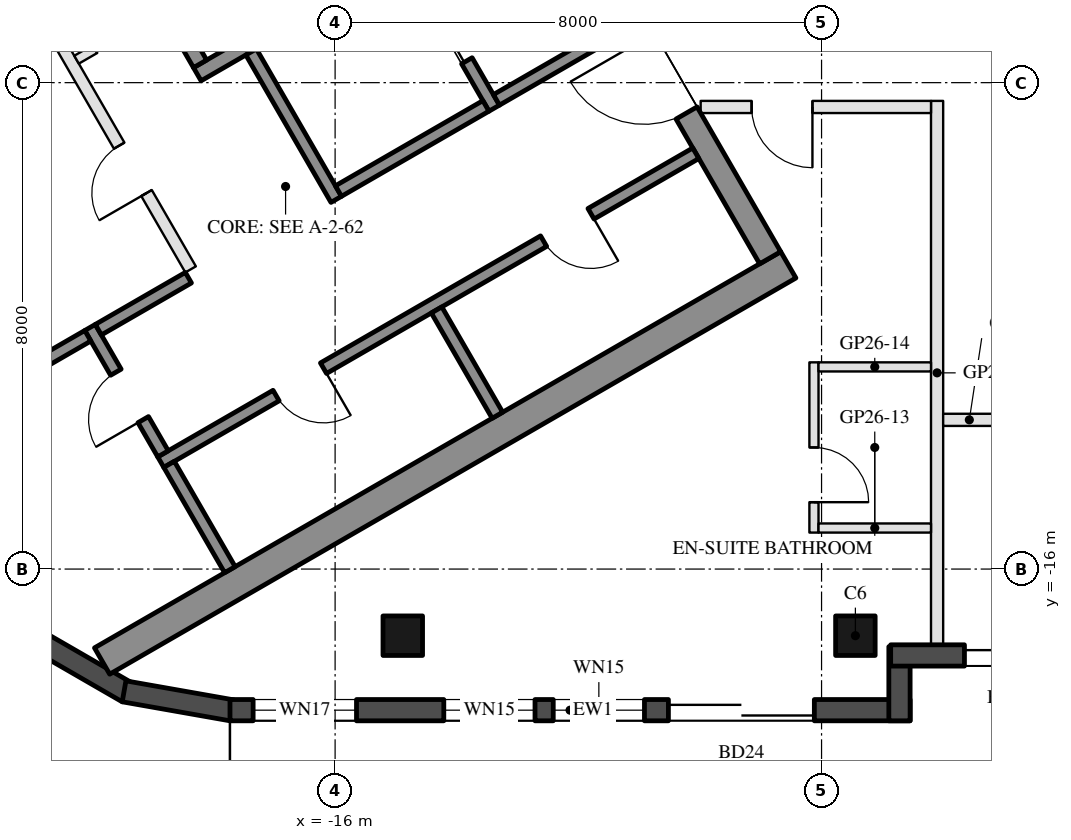
"""IFC4 building model, lengths in metres.
Left out: names, types, materials, properties, quantities, classifications, styles, units other than length and angle.
Written with IfcOpenShell. Run it as: python <this file> out.ifc"""

import sys

from ifc_helpers import new_model, si_unit, direction, frame, frame_2d, origin, origin_2d, place, context, subcontext, project, spatial, rectangle, hollow_rectangle, extrude, boolean, halfspace, element, fill, save


model = new_model("IFC4")
c1 = context("Model", 3, precision=1e-05, world=origin(), true_north=direction((0.0, 1.0)))
c2 = subcontext(c1, "Body", "Model", "MODEL_VIEW")
j1 = project(units=[si_unit("LENGTHUNIT", "METRE"), si_unit("PLANEANGLEUNIT", "RADIAN")], contexts=[c1])
p1 = place(None, origin())
s1 = spatial("IfcSite", under=j1, at=p1, CompositionType="ELEMENT")
p2 = place(p1, origin())
s2 = spatial("IfcBuilding", under=s1, at=p2, CompositionType="ELEMENT")
p3 = place(p2, frame((0.0, 0.0, 268.9)))
s3 = spatial("IfcBuildingStorey", under=s2, at=p3, CompositionType="ELEMENT", Elevation=268.9)
p4 = place(p3, frame((-14.887, -17.096, 0.0), z_axis=(0.0, 0.0, 1.0), x_axis=(-1.0, 0.0, 0.0)))
e1 = element("IfcColumn", 1, at=p4, inside=s3, PredefinedType="COLUMN", context=c2, shape_type="SweptSolid", body=[
    boolean("DIFFERENCE", extrude(hollow_rectangle(XDim=0.65, YDim=0.65, WallThickness=0.03, at=origin_2d()), origin(), (0.0, 0.0, 1.0), 3.7), halfspace(frame((0.0, 0.0, 0.047), z_axis=(0.0, 0.0, 1.0), x_axis=(1.0, 0.0, 0.0)), True)),
])
p5 = place(p3, frame((-7.444, -17.096, 0.0), z_axis=(0.0, 0.0, 1.0), x_axis=(-1.0, 0.0, 0.0)))
e2 = element("IfcColumn", 2, at=p5, inside=s3, PredefinedType="COLUMN", context=c2, shape_type="SweptSolid", body=[
    boolean("DIFFERENCE", extrude(hollow_rectangle(XDim=0.65, YDim=0.65, WallThickness=0.03, at=origin_2d()), origin(), (0.0, 0.0, 1.0), 3.7), halfspace(frame((0.0, 0.0, 0.04), z_axis=(0.0, 0.0, 1.0), x_axis=(1.0, 0.0, 0.0)), True)),
])
p6 = place(p3, frame((-20.972, -17.132, 0.0), z_axis=(0.0, 0.0, 1.0), x_axis=(0.866047807691, -0.499961193289, 0.0)))
e3 = element("IfcWall", 3, at=p6, inside=s3, PredefinedType="SOLIDWALL", context=c2, shape_type="SweptSolid", body=[
    extrude(rectangle(XDim=1.8, YDim=0.35, at=frame_2d((0.9, 0.0))), origin(), (0.0, 0.0, 1.0), 3.55),
])
p7 = place(p3, frame((-19.471, -18.011, 0.0), z_axis=(0.0, 0.0, 1.0), x_axis=(0.984810858511, -0.173630564586, 0.0)))
e4 = element("IfcWall", 4, at=p7, inside=s3, PredefinedType="SOLIDWALL", context=c2, shape_type="SweptSolid", body=[
    extrude(rectangle(XDim=1.8, YDim=0.35, at=frame_2d((0.9, 0.0))), origin(), (0.0, 0.0, 1.0), 3.55),
])
p8 = place(p3, frame((-17.729, -18.321, 0.0), z_axis=(0.0, 0.0, 1.0), x_axis=(1.0, 0.0, 0.0)))
e5 = element("IfcWall", 5, at=p8, inside=s3, PredefinedType="SOLIDWALL", context=c2, shape_type="SweptSolid", body=[
    extrude(rectangle(XDim=11.185, YDim=0.35, at=frame_2d((5.593, 0.0))), origin(), (0.0, 0.0, 1.0), 3.55),
])
p9 = place(p8, frame((0.381, 0.0, 0.3)))
e6 = element("IfcOpeningElement", 6, at=p9, cuts=e5, PredefinedType="OPENING", context=c2, shape_type="SweptSolid", body=[
    extrude(rectangle(XDim=1.7, YDim=2.65, at=frame_2d((0.85, 1.325))), frame((0.0, 0.185, 0.0), z_axis=(0.0, -1.0, 0.0), x_axis=(1.0, 0.0, 0.0)), (0.0, 0.0, 1.0), 0.37),
])
p10 = place(p8, frame((7.21, 0.0, 0.0)))
e7 = element("IfcOpeningElement", 7, at=p10, cuts=e5, PredefinedType="OPENING", context=c2, shape_type="SweptSolid", body=[
    extrude(rectangle(XDim=2.4, YDim=2.4, at=frame_2d((1.2, 1.2))), frame((0.0, 0.185, 0.0), z_axis=(0.0, -1.0, 0.0), x_axis=(1.0, 0.0, 0.0)), (0.0, 0.0, 1.0), 0.37),
])
p11 = place(p8, frame((3.516, 0.0, 0.3)))
e8 = element("IfcOpeningElement", 8, at=p11, cuts=e5, PredefinedType="OPENING", context=c2, shape_type="SweptSolid", body=[
    extrude(rectangle(XDim=1.5, YDim=2.65, at=frame_2d((0.75, 1.325))), frame((0.0, 0.185, 0.0), z_axis=(0.0, -1.0, 0.0), x_axis=(1.0, 0.0, 0.0)), (0.0, 0.0, 1.0), 0.37),
])
p12 = place(p8, frame((5.316, 0.0, 0.3)))
e9 = element("IfcOpeningElement", 9, at=p12, cuts=e5, PredefinedType="OPENING", context=c2, shape_type="SweptSolid", body=[
    extrude(rectangle(XDim=1.5, YDim=2.65, at=frame_2d((0.75, 1.325))), frame((0.0, 0.185, 0.0), z_axis=(0.0, -1.0, 0.0), x_axis=(1.0, 0.0, 0.0)), (0.0, 0.0, 1.0), 0.37),
])
p13 = place(p3, frame((-6.719, -18.496, 0.0), z_axis=(0.0, 0.0, 1.0), x_axis=(0.0, 1.0, 0.0)))
e10 = element("IfcWall", 10, at=p13, inside=s3, PredefinedType="SOLIDWALL", context=c2, shape_type="SweptSolid", body=[
    extrude(rectangle(XDim=1.22, YDim=0.35, at=frame_2d((0.61, 0.0))), origin(), (0.0, 0.0, 1.0), 3.55),
])
p14 = place(p3, frame((-6.864, -17.421, 0.0), z_axis=(0.0, 0.0, 1.0), x_axis=(1.0, 0.0, 0.0)))
e11 = element("IfcWall", 11, at=p14, inside=s3, PredefinedType="SOLIDWALL", context=c2, shape_type="SweptSolid", body=[
    extrude(rectangle(XDim=6.283, YDim=0.35, at=frame_2d((3.142, 0.0))), origin(), (0.0, 0.0, 1.0), 3.55),
])
p15 = place(p14, frame((1.213, 0.0, 0.0)))
e12 = element("IfcOpeningElement", 12, at=p15, cuts=e11, PredefinedType="OPENING", context=c2, shape_type="SweptSolid", body=[
    extrude(rectangle(XDim=1.5, YDim=2.4, at=frame_2d((0.75, 1.2))), frame((0.0, 0.185, 0.0), z_axis=(0.0, -1.0, 0.0), x_axis=(1.0, 0.0, 0.0)), (0.0, 0.0, 1.0), 0.37),
])
p16 = place(p14, frame((3.013, 0.0, 0.3)))
e13 = element("IfcOpeningElement", 13, at=p16, cuts=e11, PredefinedType="OPENING", context=c2, shape_type="SweptSolid", body=[
    extrude(rectangle(XDim=0.8, YDim=2.65, at=frame_2d((0.4, 1.325))), frame((0.0, 0.185, 0.0), z_axis=(0.0, -1.0, 0.0), x_axis=(1.0, 0.0, 0.0)), (0.0, 0.0, 1.0), 0.37),
])
for number, where, z_axis, x_axis in (
    (14, (-13.797, -1.903, 0.0), (0.0, 0.0, 1.0), (-0.866, -0.5, 0.0)),
    (15, (-8.547, -10.997, 0.0), (0.0, 0.0, 1.0), (-0.866, -0.5, 0.0)),
):
    element("IfcWall", number, at=place(p3, frame(where, z_axis=z_axis, x_axis=x_axis)), inside=s3, PredefinedType="SHEAR", context=c2, shape_type="SweptSolid", body=[
        extrude(rectangle(XDim=13.031, YDim=0.5, at=frame_2d((6.516, 0.0))), origin(), (0.0, 0.0, 1.0), 3.5),
    ])
p17 = place(p3, frame((-13.845, -2.22, 0.0), z_axis=(0.0, 0.0, 1.0), x_axis=(0.500004234368, -0.866022959057, 0.0)))
e16 = element("IfcWall", 16, at=p17, inside=s3, PredefinedType="SHEAR", context=c2, shape_type="SweptSolid", body=[
    extrude(rectangle(XDim=10.0, YDim=0.4, at=frame_2d((5.0, 0.0))), origin(), (0.0, 0.0, 1.0), 3.5),
])
p18 = place(p17, frame((3.55, 0.0, 0.0)))
e17 = element("IfcOpeningElement", 17, at=p18, cuts=e16, PredefinedType="OPENING", context=c2, shape_type="SweptSolid", body=[
    extrude(rectangle(XDim=1.1, YDim=2.1, at=frame_2d((0.55, 1.05))), frame((0.0, 0.21, 0.0), z_axis=(0.0, -1.0, 0.0), x_axis=(1.0, 0.0, 0.0)), (0.0, 0.0, 1.0), 0.42),
])
p19 = place(p17, frame((5.85, 0.0, 0.0)))
e18 = element("IfcOpeningElement", 18, at=p19, cuts=e16, PredefinedType="OPENING", context=c2, shape_type="SweptSolid", body=[
    extrude(rectangle(XDim=1.4, YDim=2.1, at=frame_2d((0.7, 1.05))), frame((0.0, 0.21, 0.0), z_axis=(0.0, -1.0, 0.0), x_axis=(1.0, 0.0, 0.0)), (0.0, 0.0, 1.0), 0.42),
])
p20 = place(p3, frame((-12.681, -4.636, 0.0), z_axis=(0.0, 0.0, 1.0), x_axis=(-0.866021702275, -0.500006411147, 0.0)))
e19 = element("IfcWall", 19, at=p20, inside=s3, PredefinedType="SHEAR", context=c2, shape_type="SweptSolid", body=[
    extrude(rectangle(XDim=6.45, YDim=0.25, at=frame_2d((3.225, 0.0))), origin(), (0.0, 0.0, 1.0), 3.5),
])
p21 = place(p20, frame((0.3, 0.0, 0.0)))
e20 = element("IfcOpeningElement", 20, at=p21, cuts=e19, PredefinedType="OPENING", context=c2, shape_type="SweptSolid", body=[
    extrude(rectangle(XDim=1.0, YDim=2.1, at=frame_2d((0.5, 1.05))), frame((0.0, 0.135, 0.0), z_axis=(0.0, -1.0, 0.0), x_axis=(1.0, 0.0, 0.0)), (0.0, 0.0, 1.0), 0.27),
])
p22 = place(p3, frame((-19.496, -5.482, 0.0), z_axis=(0.0, 0.0, 1.0), x_axis=(0.499990435942, -0.866030925526, 0.0)))
e21 = element("IfcWall", 21, at=p22, inside=s3, PredefinedType="SHEAR", context=c2, shape_type="SweptSolid", body=[
    extrude(rectangle(XDim=2.55, YDim=0.25, at=frame_2d((1.275, 0.0))), origin(), (0.0, 0.0, 1.0), 3.5),
])
p23 = place(p3, frame((-17.381, -7.495, 0.0), z_axis=(0.0, 0.0, 1.0), x_axis=(0.500011755427, -0.866018616679, 0.0)))
e22 = element("IfcWall", 22, at=p23, inside=s3, PredefinedType="SHEAR", context=c2, shape_type="SweptSolid", body=[
    extrude(rectangle(XDim=2.8, YDim=0.2, at=frame_2d((1.4, 0.0))), origin(), (0.0, 0.0, 1.0), 3.5),
])
p24 = place(p3, frame((-14.783, -5.995, 0.0), z_axis=(0.0, 0.0, 1.0), x_axis=(0.49994636267, -0.866056369097, 0.0)))
e23 = element("IfcWall", 23, at=p24, inside=s3, PredefinedType="SHEAR", context=c2, shape_type="SweptSolid", body=[
    extrude(rectangle(XDim=2.8, YDim=0.2, at=frame_2d((1.4, 0.0))), origin(), (0.0, 0.0, 1.0), 3.5),
])
p25 = place(p24, frame((0.7, 0.0, 0.0)))
e24 = element("IfcOpeningElement", 24, at=p25, cuts=e23, PredefinedType="OPENING", context=c2, shape_type="SweptSolid", body=[
    extrude(rectangle(XDim=1.2, YDim=2.1, at=frame_2d((0.6, 1.05))), frame((0.0, 0.11, 0.0), z_axis=(0.0, -1.0, 0.0), x_axis=(1.0, 0.0, 0.0)), (0.0, 0.0, 1.0), 0.22),
])
p26 = place(p3, frame((-13.52, -8.383, 0.0), z_axis=(0.0, 0.0, 1.0), x_axis=(-0.866034573852, -0.49998411664, 0.0)))
e25 = element("IfcWall", 25, at=p26, inside=s3, PredefinedType="SHEAR", context=c2, shape_type="SweptSolid", body=[
    extrude(rectangle(XDim=2.8, YDim=0.2, at=frame_2d((1.4, 0.0))), origin(), (0.0, 0.0, 1.0), 3.5),
])
p27 = place(p3, frame((-11.268, -7.083, 0.0), z_axis=(0.0, 0.0, 1.0), x_axis=(-0.866050077142, -0.499957262057, 0.0)))
e26 = element("IfcWall", 26, at=p27, inside=s3, PredefinedType="SHEAR", context=c2, shape_type="SweptSolid", body=[
    extrude(rectangle(XDim=2.4, YDim=0.2, at=frame_2d((1.2, 0.0))), origin(), (0.0, 0.0, 1.0), 3.5),
])
p28 = place(p3, frame((-10.068, -9.162, 0.0), z_axis=(0.0, 0.0, 1.0), x_axis=(-0.866032725843, -0.499987317609, 0.0)))
e27 = element("IfcWall", 27, at=p28, inside=s3, PredefinedType="SHEAR", context=c2, shape_type="SweptSolid", body=[
    extrude(rectangle(XDim=10.16, YDim=0.2, at=frame_2d((5.08, 0.0))), origin(), (0.0, 0.0, 1.0), 3.5),
])
p29 = place(p28, frame((1.99, 0.0, 0.0)))
e28 = element("IfcOpeningElement", 28, at=p29, cuts=e27, PredefinedType="OPENING", context=c2, shape_type="SweptSolid", body=[
    extrude(rectangle(XDim=0.9, YDim=2.1, at=frame_2d((0.45, 1.05))), frame((0.0, 0.11, 0.0), z_axis=(0.0, -1.0, 0.0), x_axis=(1.0, 0.0, 0.0)), (0.0, 0.0, 1.0), 0.22),
])
p30 = place(p28, frame((7.07, 0.0, 0.0)))
e29 = element("IfcOpeningElement", 29, at=p30, cuts=e27, PredefinedType="OPENING", context=c2, shape_type="SweptSolid", body=[
    extrude(rectangle(XDim=0.9, YDim=2.1, at=frame_2d((0.45, 1.05))), frame((0.0, 0.11, 0.0), z_axis=(0.0, -1.0, 0.0), x_axis=(1.0, 0.0, 0.0)), (0.0, 0.0, 1.0), 0.22),
])
p31 = place(p3, frame((-20.031, -12.026, 0.0), z_axis=(0.0, 0.0, 1.0), x_axis=(0.500033551112, -0.866006032174, 0.0)))
e30 = element("IfcWall", 30, at=p31, inside=s3, PredefinedType="SHEAR", context=c2, shape_type="SweptSolid", body=[
    extrude(rectangle(XDim=2.4, YDim=0.2, at=frame_2d((1.2, 0.0))), origin(), (0.0, 0.0, 1.0), 3.5),
])
p32 = place(p31, frame((0.85, 0.0, 0.0)))
e31 = element("IfcOpeningElement", 31, at=p32, cuts=e30, PredefinedType="OPENING", context=c2, shape_type="SweptSolid", body=[
    extrude(rectangle(XDim=0.9, YDim=2.1, at=frame_2d((0.45, 1.05))), frame((0.0, 0.11, 0.0), z_axis=(0.0, -1.0, 0.0), x_axis=(1.0, 0.0, 0.0)), (0.0, 0.0, 1.0), 0.22),
])
p33 = place(p3, frame((-18.413, -11.208, 0.0), z_axis=(0.0, 0.0, 1.0), x_axis=(-0.866038183914, -0.499977863513, 0.0)))
e32 = element("IfcWall", 32, at=p33, inside=s3, PredefinedType="SHEAR", context=c2, shape_type="SweptSolid", body=[
    extrude(rectangle(XDim=1.71, YDim=0.2, at=frame_2d((0.855, 0.0))), origin(), (0.0, 0.0, 1.0), 3.5),
])
for number, where, z_axis, x_axis in (
    (33, (-14.331, -11.738, 0.0), (0.0, 0.0, 1.0), (0.5, -0.866, 0.0)),
    (34, (-18.73, -14.278, 0.0), (0.0, 0.0, 1.0), (0.5, -0.866, 0.0)),
):
    element("IfcWall", number, at=place(p3, frame(where, z_axis=z_axis, x_axis=x_axis)), inside=s3, PredefinedType="SHEAR", context=c2, shape_type="SweptSolid", body=[
        extrude(rectangle(XDim=2.0, YDim=0.2, at=frame_2d((1.0, 0.0))), origin(), (0.0, 0.0, 1.0), 3.5),
    ])
p34 = place(p3, frame((-20.067, -12.163, 0.0), z_axis=(0.0, 0.0, 1.0), x_axis=(-0.866094443108, -0.499880401313, 0.0)))
e35 = element("IfcWall", 35, at=p34, inside=s3, PredefinedType="SHEAR", context=c2, shape_type="SweptSolid", body=[
    extrude(rectangle(XDim=1.383, YDim=0.2, at=frame_2d((0.691, 0.0))), origin(), (0.0, 0.0, 1.0), 3.5),
])
p35 = place(p3, frame((-21.076, -6.395, 0.0), z_axis=(0.0, 0.0, 1.0), x_axis=(0.50001468107, -0.866016927499, 0.0)))
e36 = element("IfcWall", 36, at=p35, inside=s3, PredefinedType="PARTITIONING", context=c2, shape_type="SweptSolid", body=[
    extrude(rectangle(XDim=5.4, YDim=0.2, at=frame_2d((2.7, 0.0))), origin(), (0.0, 0.0, 1.0), 3.5),
])
p36 = place(p35, frame((3.05, 0.0, 0.0)))
e37 = element("IfcOpeningElement", 37, at=p36, cuts=e36, PredefinedType="OPENING", context=c2, shape_type="SweptSolid", body=[
    extrude(rectangle(XDim=0.9, YDim=2.1, at=frame_2d((0.45, 1.05))), frame((0.0, 0.11, 0.0), z_axis=(0.0, -1.0, 0.0), x_axis=(1.0, 0.0, 0.0)), (0.0, 0.0, 1.0), 0.22),
])
p37 = place(p3, frame((-18.866, -6.822, 0.0), z_axis=(0.0, 0.0, 1.0), x_axis=(-0.866028054938, -0.499995408039, 0.0)))
e38 = element("IfcWall", 38, at=p37, inside=s3, PredefinedType="PARTITIONING", context=c2, shape_type="SweptSolid", body=[
    extrude(rectangle(XDim=1.6, YDim=0.15, at=frame_2d((0.8, 0.0))), origin(), (0.0, 0.0, 1.0), 3.5),
])
p38 = place(p37, frame((0.35, 0.0, 0.0)))
e39 = element("IfcOpeningElement", 39, at=p38, cuts=e38, PredefinedType="OPENING", context=c2, shape_type="SweptSolid", body=[
    extrude(rectangle(XDim=0.9, YDim=2.1, at=frame_2d((0.45, 1.05))), frame((0.0, 0.085, 0.0), z_axis=(0.0, -1.0, 0.0), x_axis=(1.0, 0.0, 0.0)), (0.0, 0.0, 1.0), 0.17),
])
p39 = place(p3, frame((-6.1, -17.246, 0.0), z_axis=(0.0, 0.0, 1.0), x_axis=(0.0, 1.0, 0.0)))
e40 = element("IfcWall", 40, at=p39, inside=s3, PredefinedType="PARTITIONING", context=c2, shape_type="SweptSolid", body=[
    extrude(rectangle(XDim=8.946, YDim=0.2, at=frame_2d((4.473, 0.0))), origin(), (0.0, 0.0, 1.0), 3.16),
])
p40 = place(p3, frame((-6.2, -8.4, 0.0), z_axis=(0.0, 0.0, 1.0), x_axis=(-1.0, 0.0, 0.0)))
e41 = element("IfcWall", 41, at=p40, inside=s3, PredefinedType="PARTITIONING", context=c2, shape_type="SweptSolid", body=[
    extrude(rectangle(XDim=3.788, YDim=0.2, at=frame_2d((1.894, 0.0))), origin(), (0.0, 0.0, 1.0), 3.0),
])
p41 = place(p40, frame((1.95, 0.0, 0.0)))
e42 = element("IfcOpeningElement", 42, at=p41, cuts=e41, PredefinedType="OPENING", context=c2, shape_type="SweptSolid", body=[
    extrude(rectangle(XDim=1.0, YDim=2.1, at=frame_2d((0.5, 1.05))), frame((0.0, 0.11, 0.0), z_axis=(0.0, -1.0, 0.0), x_axis=(1.0, 0.0, 0.0)), (0.0, 0.0, 1.0), 0.22),
])
p42 = place(p3, frame((-8.125, -12.6, 0.0), z_axis=(0.0, 0.0, 1.0), x_axis=(0.0, -1.0, 0.0)))
e43 = element("IfcWall", 43, at=p42, inside=s3, PredefinedType="PARTITIONING", context=c2, shape_type="SweptSolid", body=[
    extrude(rectangle(XDim=2.8, YDim=0.15, at=frame_2d((1.4, 0.0))), origin(), (0.0, 0.0, 1.0), 3.55),
])
p43 = place(p42, frame((1.4, 0.0, 0.0)))
e44 = element("IfcOpeningElement", 44, at=p43, cuts=e43, PredefinedType="OPENING", context=c2, shape_type="SweptSolid", body=[
    extrude(rectangle(XDim=0.9, YDim=2.1, at=frame_2d((0.45, 1.05))), frame((0.0, 0.085, 0.0), z_axis=(0.0, -1.0, 0.0), x_axis=(1.0, 0.0, 0.0)), (0.0, 0.0, 1.0), 0.17),
])
for number, where, z_axis, x_axis in (
    (45, (-8.05, -15.325, 0.0), (0.0, 0.0, 1.0), (1.0, 0.0, 0.0)),
    (46, (-8.05, -12.675, 0.0), (0.0, 0.0, 1.0), (1.0, 0.0, 0.0)),
):
    element("IfcWall", number, at=place(p3, frame(where, z_axis=z_axis, x_axis=x_axis)), inside=s3, PredefinedType="PARTITIONING", context=c2, shape_type="SweptSolid", body=[
        extrude(rectangle(XDim=1.85, YDim=0.15, at=frame_2d((0.925, 0.0))), origin(), (0.0, 0.0, 1.0), 3.0),
    ])
p44 = place(p3, frame((-2.414, -13.546, 0.0), z_axis=(0.0, 0.0, 1.0), x_axis=(-1.0, 0.0, 0.0)))
e47 = element("IfcWall", 47, at=p44, inside=s3, PredefinedType="PARTITIONING", context=c2, shape_type="SweptSolid", body=[
    extrude(rectangle(XDim=3.586, YDim=0.2, at=frame_2d((1.793, 0.0))), origin(), (0.0, 0.0, 1.0), 3.0),
])
p45 = place(p44, frame((1.293, 0.0, 0.0)))
e48 = element("IfcOpeningElement", 48, at=p45, cuts=e47, PredefinedType="OPENING", context=c2, shape_type="SweptSolid", body=[
    extrude(rectangle(XDim=1.0, YDim=2.1, at=frame_2d((0.5, 1.05))), frame((0.0, 0.11, 0.0), z_axis=(0.0, -1.0, 0.0), x_axis=(1.0, 0.0, 0.0)), (0.0, 0.0, 1.0), 0.22),
])
p46 = place(p9, origin())
e49 = element("IfcWindow", 49, at=p46, inside=s3, PartitioningType="SINGLE_PANEL", PredefinedType="WINDOW", context=c2, shape_type="SweptSolid", body=[
    extrude(rectangle(XDim=1.7, YDim=2.65, at=frame_2d((0.85, 1.325))), frame((0.0, 0.03, 0.0), z_axis=(0.0, -1.0, 0.0), x_axis=(1.0, 0.0, 0.0)), (0.0, 0.0, 1.0), 0.06),
])
fill(e6, e49)
p47 = place(p10, frame((2.4, 0.0, 0.0), z_axis=(0.0, 0.0, 1.0), x_axis=(-1.0, 0.0, 0.0)))
e50 = element("IfcDoor", 50, at=p47, inside=s3, OperationType="SLIDING_TO_LEFT", PredefinedType="DOOR", context=c2, shape_type="SweptSolid", body=[
    extrude(rectangle(XDim=2.4, YDim=2.4, at=frame_2d((1.2, 1.2))), frame((0.0, 0.025, 0.0), z_axis=(0.0, -1.0, 0.0), x_axis=(1.0, 0.0, 0.0)), (0.0, 0.0, 1.0), 0.05),
])
fill(e7, e50)
p48 = place(p11, origin())
e51 = element("IfcWindow", 51, at=p48, inside=s3, PartitioningType="SINGLE_PANEL", PredefinedType="WINDOW", context=c2, shape_type="SweptSolid", body=[
    extrude(rectangle(XDim=1.5, YDim=2.65, at=frame_2d((0.75, 1.325))), frame((0.0, 0.03, 0.0), z_axis=(0.0, -1.0, 0.0), x_axis=(1.0, 0.0, 0.0)), (0.0, 0.0, 1.0), 0.06),
])
fill(e8, e51)
p49 = place(p12, origin())
e52 = element("IfcWindow", 52, at=p49, inside=s3, PartitioningType="SINGLE_PANEL", PredefinedType="WINDOW", context=c2, shape_type="SweptSolid", body=[
    extrude(rectangle(XDim=1.5, YDim=2.65, at=frame_2d((0.75, 1.325))), frame((0.0, 0.03, 0.0), z_axis=(0.0, -1.0, 0.0), x_axis=(1.0, 0.0, 0.0)), (0.0, 0.0, 1.0), 0.06),
])
fill(e9, e52)
p50 = place(p15, frame((1.5, 0.0, 0.0), z_axis=(0.0, 0.0, 1.0), x_axis=(-1.0, 0.0, 0.0)))
e53 = element("IfcDoor", 53, at=p50, inside=s3, OperationType="SLIDING_TO_LEFT", PredefinedType="DOOR", context=c2, shape_type="SweptSolid", body=[
    extrude(rectangle(XDim=1.5, YDim=2.4, at=frame_2d((0.75, 1.2))), frame((0.0, 0.025, 0.0), z_axis=(0.0, -1.0, 0.0), x_axis=(1.0, 0.0, 0.0)), (0.0, 0.0, 1.0), 0.05),
])
fill(e12, e53)
p51 = place(p25, origin())
e54 = element("IfcDoor", 54, at=p51, inside=s3, OperationType="DOUBLE_DOOR_SLIDING", PredefinedType="DOOR", context=c2, shape_type="SweptSolid", body=[
    extrude(rectangle(XDim=1.2, YDim=2.1, at=frame_2d((0.6, 1.05))), frame((0.0, 0.025, 0.0), z_axis=(0.0, -1.0, 0.0), x_axis=(1.0, 0.0, 0.0)), (0.0, 0.0, 1.0), 0.05),
])
fill(e24, e54)
p52 = place(p29, origin())
e55 = element("IfcDoor", 55, at=p52, inside=s3, OperationType="SINGLE_SWING_LEFT", PredefinedType="DOOR", context=c2, shape_type="SweptSolid", body=[
    extrude(rectangle(XDim=0.9, YDim=2.1, at=frame_2d((0.45, 1.05))), frame((0.0, 0.025, 0.0), z_axis=(0.0, -1.0, 0.0), x_axis=(1.0, 0.0, 0.0)), (0.0, 0.0, 1.0), 0.05),
])
fill(e28, e55)
p53 = place(p30, origin())
e56 = element("IfcDoor", 56, at=p53, inside=s3, OperationType="SINGLE_SWING_LEFT", PredefinedType="DOOR", context=c2, shape_type="SweptSolid", body=[
    extrude(rectangle(XDim=0.9, YDim=2.1, at=frame_2d((0.45, 1.05))), frame((0.0, 0.025, 0.0), z_axis=(0.0, -1.0, 0.0), x_axis=(1.0, 0.0, 0.0)), (0.0, 0.0, 1.0), 0.05),
])
fill(e29, e56)
p54 = place(p32, frame((0.9, 0.0, 0.0), z_axis=(0.0, 0.0, 1.0), x_axis=(-1.0, 0.0, 0.0)))
e57 = element("IfcDoor", 57, at=p54, inside=s3, OperationType="SINGLE_SWING_LEFT", PredefinedType="DOOR", context=c2, shape_type="SweptSolid", body=[
    extrude(rectangle(XDim=0.9, YDim=2.1, at=frame_2d((0.45, 1.05))), frame((0.0, 0.025, 0.0), z_axis=(0.0, -1.0, 0.0), x_axis=(1.0, 0.0, 0.0)), (0.0, 0.0, 1.0), 0.05),
])
fill(e31, e57)
p55 = place(p36, frame((0.9, 0.0, 0.0), z_axis=(0.0, 0.0, 1.0), x_axis=(-1.0, 0.0, 0.0)))
e58 = element("IfcDoor", 58, at=p55, inside=s3, OperationType="SINGLE_SWING_LEFT", PredefinedType="DOOR", context=c2, shape_type="SweptSolid", body=[
    extrude(rectangle(XDim=0.9, YDim=2.1, at=frame_2d((0.45, 1.05))), frame((0.0, 0.025, 0.0), z_axis=(0.0, -1.0, 0.0), x_axis=(1.0, 0.0, 0.0)), (0.0, 0.0, 1.0), 0.05),
])
fill(e37, e58)
p56 = place(p19, frame((1.4, 0.0, 0.0), z_axis=(0.0, 0.0, 1.0), x_axis=(-1.0, 0.0, 0.0)))
e59 = element("IfcDoor", 59, at=p56, inside=s3, OperationType="DOUBLE_DOOR_SINGLE_SWING", PredefinedType="DOOR", context=c2, shape_type="SweptSolid", body=[
    extrude(rectangle(XDim=1.4, YDim=2.1, at=frame_2d((0.7, 1.05))), frame((0.0, 0.025, 0.0), z_axis=(0.0, -1.0, 0.0), x_axis=(1.0, 0.0, 0.0)), (0.0, 0.0, 1.0), 0.05),
])
fill(e18, e59)
p57 = place(p43, origin())
e60 = element("IfcDoor", 60, at=p57, inside=s3, OperationType="SINGLE_SWING_RIGHT", PredefinedType="DOOR", context=c2, shape_type="SweptSolid", body=[
    extrude(rectangle(XDim=0.9, YDim=2.1, at=frame_2d((0.45, 1.05))), frame((0.0, 0.025, 0.0), z_axis=(0.0, -1.0, 0.0), x_axis=(1.0, 0.0, 0.0)), (0.0, 0.0, 1.0), 0.05),
])
fill(e44, e60)
p58 = place(p41, origin())
e61 = element("IfcDoor", 61, at=p58, inside=s3, OperationType="SINGLE_SWING_LEFT", PredefinedType="DOOR", context=c2, shape_type="SweptSolid", body=[
    extrude(rectangle(XDim=1.0, YDim=2.1, at=frame_2d((0.5, 1.05))), frame((0.0, 0.025, 0.0), z_axis=(0.0, -1.0, 0.0), x_axis=(1.0, 0.0, 0.0)), (0.0, 0.0, 1.0), 0.05),
])
fill(e42, e61)
save(model, sys.argv[1])
